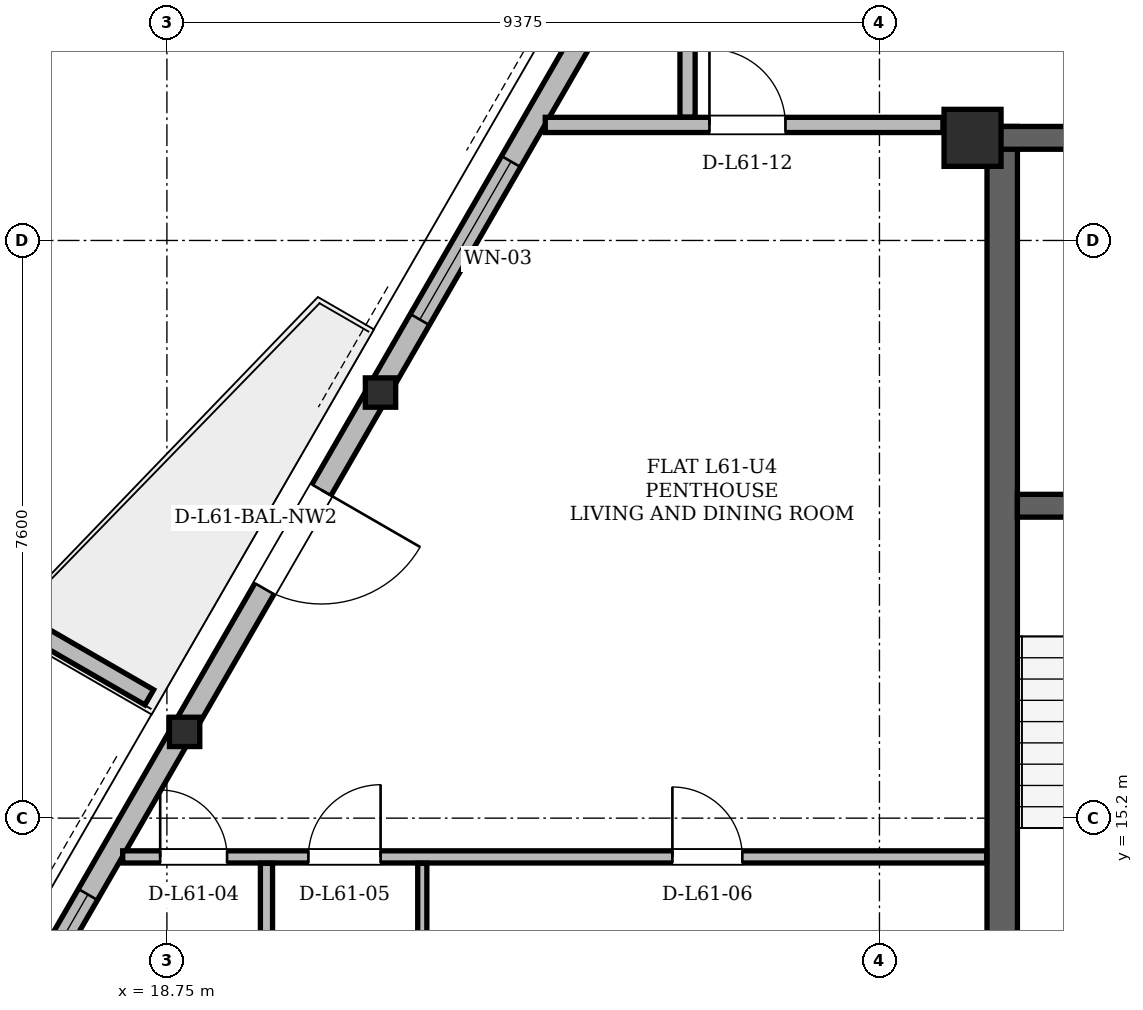
"""IFC4 building model, lengths in metres.
Left out: names, types, materials, properties, quantities, classifications, styles, units other than length and angle.
Written with IfcOpenShell. Run it as: python <this file> out.ifc"""

import sys

from ifc_helpers import new_model, si_unit, direction, frame, frame_2d, origin, origin_2d, place, context, subcontext, project, spatial, polyline, rectangle, hollow_rectangle, i_section, outline, extrude, element, fill, save


model = new_model("IFC4")
c1 = context("Model", 3, precision=1e-05, world=origin(), true_north=direction((0.0, 1.0)))
c2 = subcontext(c1, "Body", "Model", "MODEL_VIEW")
j1 = project(units=[si_unit("LENGTHUNIT", "METRE"), si_unit("PLANEANGLEUNIT", "RADIAN")], contexts=[c1])
p1 = place(None, origin())
s1 = spatial("IfcSite", under=j1, at=p1, CompositionType="ELEMENT")
p2 = place(p1, origin())
s2 = spatial("IfcBuilding", under=s1, at=p2, CompositionType="ELEMENT")
p3 = place(p2, frame((0.0, 0.0, 230.7)))
s3 = spatial("IfcBuildingStorey", under=s2, at=p3, CompositionType="ELEMENT", Elevation=230.7)
p4 = place(p3, frame((29.35, 24.15, 0.0), z_axis=(0.0, 0.0, 1.0), x_axis=(1.0, 0.0, 0.0)))
e1 = element("IfcColumn", 1, at=p4, inside=s3, PredefinedType="COLUMN", context=c2, shape_type="SweptSolid", body=[
    extrude(hollow_rectangle(XDim=0.75, YDim=0.75, WallThickness=0.06, at=origin_2d()), origin(), (0.0, 0.0, 1.0), 3.6),
])
p5 = place(p3, frame((21.535, 20.82, 0.005), z_axis=(0.01407165098, -0.011488449351, 0.999834988471), x_axis=(0.632422318611, 0.774623786701, 0.0)))
e2 = element("IfcColumn", 2, at=p5, inside=s3, PredefinedType="COLUMN", context=c2, shape_type="SweptSolid", body=[
    extrude(i_section(OverallWidth=0.399, OverallDepth=0.386, WebThickness=0.021, FlangeThickness=0.033, at=origin_2d()), origin(), (0.0, 0.0, 1.0), 3.591),
])
p6 = place(p3, frame((18.959, 16.359, 0.005), z_axis=(0.012983894256, -0.013255808272, 0.999827836198), x_axis=(0.714395955768, 0.699741679752, 0.0)))
e3 = element("IfcColumn", 3, at=p6, inside=s3, PredefinedType="COLUMN", context=c2, shape_type="SweptSolid", body=[
    extrude(i_section(OverallWidth=0.399, OverallDepth=0.386, WebThickness=0.021, FlangeThickness=0.033, at=origin_2d()), origin(), (0.0, 0.0, 1.0), 3.592),
])
p7 = place(p3, frame((29.74, 11.0, 0.0), z_axis=(0.0, 0.0, 1.0), x_axis=(0.0, 1.0, 0.0)))
e4 = element("IfcWall", 4, at=p7, inside=s3, PredefinedType="SHEAR", context=c2, shape_type="SweptSolid", body=[
    extrude(rectangle(XDim=13.3, YDim=0.4, at=frame_2d((6.65, 0.0))), origin(), (0.0, 0.0, 1.0), 3.38),
])
p8 = place(p3, frame((29.65, 24.15, 0.0), z_axis=(0.0, 0.0, 1.0), x_axis=(1.0, 0.0, 0.0)))
e5 = element("IfcWall", 5, at=p8, inside=s3, PredefinedType="SHEAR", context=c2, shape_type="SweptSolid", body=[
    extrude(rectangle(XDim=15.7, YDim=0.3, at=frame_2d((7.85, 0.0))), origin(), (0.0, 0.0, 1.0), 3.38),
])
p9 = place(p8, frame((1.7, 0.0, 0.0)))
e6 = element("IfcOpeningElement", 6, at=p9, cuts=e5, PredefinedType="OPENING", context=c2, shape_type="SweptSolid", body=[
    extrude(rectangle(XDim=1.2, YDim=2.2, at=frame_2d((0.6, 1.1))), frame((0.0, 0.15, 0.0), z_axis=(0.0, -1.0, 0.0), x_axis=(1.0, 0.0, 0.0)), (0.0, 0.0, 1.0), 0.3),
])
p10 = place(p8, frame((12.8, 0.0, 0.0)))
e7 = element("IfcOpeningElement", 7, at=p10, cuts=e5, PredefinedType="OPENING", context=c2, shape_type="SweptSolid", body=[
    extrude(rectangle(XDim=1.2, YDim=2.2, at=frame_2d((0.6, 1.1))), frame((0.0, 0.15, 0.0), z_axis=(0.0, -1.0, 0.0), x_axis=(1.0, 0.0, 0.0)), (0.0, 0.0, 1.0), 0.3),
])
p11 = place(p8, frame((6.55, 0.0, 0.0)))
e8 = element("IfcOpeningElement", 8, at=p11, cuts=e5, PredefinedType="OPENING", context=c2, shape_type="SweptSolid", body=[
    extrude(rectangle(XDim=0.9, YDim=2.05, at=frame_2d((0.45, 1.025))), frame((0.0, 0.15, 0.0), z_axis=(0.0, -1.0, 0.0), x_axis=(1.0, 0.0, 0.0)), (0.0, 0.0, 1.0), 0.3),
])
p12 = place(p8, frame((8.45, 0.0, 0.0)))
e9 = element("IfcOpeningElement", 9, at=p12, cuts=e5, PredefinedType="OPENING", context=c2, shape_type="SweptSolid", body=[
    extrude(rectangle(XDim=0.9, YDim=2.05, at=frame_2d((0.45, 1.025))), frame((0.0, 0.15, 0.0), z_axis=(0.0, -1.0, 0.0), x_axis=(1.0, 0.0, 0.0)), (0.0, 0.0, 1.0), 0.3),
])
p13 = place(p3, frame((29.94, 19.31, 0.0), z_axis=(0.0, 0.0, 1.0), x_axis=(1.0, 0.0, 0.0)))
e10 = element("IfcWall", 10, at=p13, inside=s3, PredefinedType="SHEAR", context=c2, shape_type="SweptSolid", body=[
    extrude(rectangle(XDim=4.01, YDim=0.3, at=frame_2d((2.005, 0.0))), origin(), (0.0, 0.0, 1.0), 3.38),
])
p14 = place(p13, frame((1.01, 0.0, 0.0)))
e11 = element("IfcOpeningElement", 11, at=p14, cuts=e10, PredefinedType="OPENING", context=c2, shape_type="SweptSolid", body=[
    extrude(rectangle(XDim=1.4, YDim=2.2, at=frame_2d((0.7, 1.1))), frame((0.0, 0.15, 0.0), z_axis=(0.0, -1.0, 0.0), x_axis=(1.0, 0.0, 0.0)), (0.0, 0.0, 1.0), 0.3),
])
p15 = place(p3, frame((34.414, 43.126, 0.0), z_axis=(0.0, 0.0, 1.0), x_axis=(-0.50000331183, -0.86602349169, 0.0)))
e12 = element("IfcWall", 12, at=p15, inside=s3, PredefinedType="SOLIDWALL", context=c2, shape_type="SweptSolid", body=[
    extrude(rectangle(XDim=36.795, YDim=0.29, at=frame_2d((18.397, 0.0))), origin(), (0.0, 0.0, 1.0), 2.677),
])
p16 = place(p15, frame((3.529, 0.0, 0.0)))
e13 = element("IfcOpeningElement", 13, at=p16, cuts=e12, PredefinedType="OPENING", context=c2, shape_type="SweptSolid", body=[
    extrude(rectangle(XDim=1.3, YDim=2.2, at=frame_2d((0.65, 1.1))), frame((0.0, 0.145, 0.0), z_axis=(0.0, -1.0, 0.0), x_axis=(1.0, 0.0, 0.0)), (0.0, 0.0, 1.0), 0.29),
])
p17 = place(p15, frame((27.261, 0.0, 0.0)))
e14 = element("IfcOpeningElement", 14, at=p17, cuts=e12, PredefinedType="OPENING", context=c2, shape_type="SweptSolid", body=[
    extrude(rectangle(XDim=1.5, YDim=2.2, at=frame_2d((0.75, 1.1))), frame((0.0, 0.145, 0.0), z_axis=(0.0, -1.0, 0.0), x_axis=(1.0, 0.0, 0.0)), (0.0, 0.0, 1.0), 0.29),
])
p18 = place(p15, frame((22.271, 0.0, 0.85)))
e15 = element("IfcOpeningElement", 15, at=p18, cuts=e12, PredefinedType="OPENING", context=c2, shape_type="SweptSolid", body=[
    extrude(rectangle(XDim=2.4, YDim=1.717, at=frame_2d((1.2, 0.858))), frame((0.0, 0.145, 0.0), z_axis=(0.0, -1.0, 0.0), x_axis=(1.0, 0.0, 0.0)), (0.0, 0.0, 1.0), 0.29),
])
p19 = place(p15, frame((33.406, 0.0, 0.85)))
e16 = element("IfcOpeningElement", 16, at=p19, cuts=e12, PredefinedType="OPENING", context=c2, shape_type="SweptSolid", body=[
    extrude(rectangle(XDim=2.2, YDim=1.717, at=frame_2d((1.1, 0.858))), frame((0.0, 0.145, 0.0), z_axis=(0.0, -1.0, 0.0), x_axis=(1.0, 0.0, 0.0)), (0.0, 0.0, 1.0), 0.29),
])
p20 = place(p15, frame((11.662, 0.0, 0.85)))
e17 = element("IfcOpeningElement", 17, at=p20, cuts=e12, PredefinedType="OPENING", context=c2, shape_type="SweptSolid", body=[
    extrude(rectangle(XDim=1.2, YDim=1.48, at=frame_2d((0.6, 0.74))), frame((0.0, 0.145, 0.0), z_axis=(0.0, -1.0, 0.0), x_axis=(1.0, 0.0, 0.0)), (0.0, 0.0, 1.0), 0.29),
])
p21 = place(p15, frame((16.295, 0.0, 0.85)))
e18 = element("IfcOpeningElement", 18, at=p21, cuts=e12, PredefinedType="OPENING", context=c2, shape_type="SweptSolid", body=[
    extrude(rectangle(XDim=1.8, YDim=1.717, at=frame_2d((0.9, 0.858))), frame((0.0, 0.145, 0.0), z_axis=(0.0, -1.0, 0.0), x_axis=(1.0, 0.0, 0.0)), (0.0, 0.0, 1.0), 0.29),
])
p22 = place(p3, frame((18.518, 16.79, 0.0), z_axis=(0.0, 0.0, 1.0), x_axis=(-0.866012356593, 0.500022597718, 0.0)))
e19 = element("IfcWall", 19, at=p22, inside=s3, PredefinedType="PARAPET", context=c2, shape_type="SweptSolid", body=[
    extrude(outline(polyline([(0.0, 0.0), (2.042, 0.0), (2.042, 1.1), (0.0, 1.32), (0.0, 0.0)])), frame((0.0, 0.115, 0.0), z_axis=(0.0, -1.0, 0.0), x_axis=(1.0, 0.0, 0.0)), (0.0, 0.0, 1.0), 0.23),
])
p23 = place(p3, frame((18.168, 14.69, 0.0), z_axis=(0.0, 0.0, 1.0), x_axis=(1.0, 0.0, 0.0)))
e20 = element("IfcWall", 20, at=p23, inside=s3, PredefinedType="PARTITIONING", context=c2, shape_type="SweptSolid", body=[
    extrude(rectangle(XDim=11.368, YDim=0.16, at=frame_2d((5.684, 0.0))), origin(), (0.0, 0.0, 1.0), 2.52),
])
p24 = place(p23, frame((0.493, 0.0, 0.0)))
e21 = element("IfcOpeningElement", 21, at=p24, cuts=e20, PredefinedType="OPENING", context=c2, shape_type="SweptSolid", body=[
    extrude(rectangle(XDim=0.88, YDim=2.08, at=frame_2d((0.44, 1.04))), frame((0.0, 0.08, 0.0), z_axis=(0.0, -1.0, 0.0), x_axis=(1.0, 0.0, 0.0)), (0.0, 0.0, 1.0), 0.16),
])
p25 = place(p23, frame((2.443, 0.0, 0.0)))
e22 = element("IfcOpeningElement", 22, at=p25, cuts=e20, PredefinedType="OPENING", context=c2, shape_type="SweptSolid", body=[
    extrude(rectangle(XDim=0.95, YDim=2.1, at=frame_2d((0.475, 1.05))), frame((0.0, 0.08, 0.0), z_axis=(0.0, -1.0, 0.0), x_axis=(1.0, 0.0, 0.0)), (0.0, 0.0, 1.0), 0.16),
])
p26 = place(p23, frame((7.232, 0.0, 0.0)))
e23 = element("IfcOpeningElement", 23, at=p26, cuts=e20, PredefinedType="OPENING", context=c2, shape_type="SweptSolid", body=[
    extrude(rectangle(XDim=0.92, YDim=2.12, at=frame_2d((0.46, 1.06))), frame((0.0, 0.08, 0.0), z_axis=(0.0, -1.0, 0.0), x_axis=(1.0, 0.0, 0.0)), (0.0, 0.0, 1.0), 0.16),
])
p27 = place(p3, frame((23.728, 24.32, 0.0), z_axis=(0.0, 0.0, 1.0), x_axis=(1.0, 0.0, 0.0)))
e24 = element("IfcWall", 24, at=p27, inside=s3, PredefinedType="PARTITIONING", context=c2, shape_type="SweptSolid", body=[
    extrude(rectangle(XDim=5.232, YDim=0.2, at=frame_2d((2.616, 0.0))), origin(), (0.0, 0.0, 1.0), 3.38),
])
p28 = place(p27, frame((2.16, 0.0, 0.0)))
e25 = element("IfcOpeningElement", 25, at=p28, cuts=e24, PredefinedType="OPENING", context=c2, shape_type="SweptSolid", body=[
    extrude(rectangle(XDim=1.0, YDim=2.18, at=frame_2d((0.5, 1.09))), frame((0.0, 0.1, 0.0), z_axis=(0.0, -1.0, 0.0), x_axis=(1.0, 0.0, 0.0)), (0.0, 0.0, 1.0), 0.2),
])
p29 = place(p3, frame((20.06, 11.054, 0.0), z_axis=(0.0, 0.0, 1.0), x_axis=(0.0, 1.0, 0.0)))
e26 = element("IfcWall", 26, at=p29, inside=s3, PredefinedType="PARTITIONING", context=c2, shape_type="SweptSolid", body=[
    extrude(rectangle(XDim=3.552, YDim=0.16, at=frame_2d((1.776, 0.0))), origin(), (0.0, 0.0, 1.0), 2.913),
])
p30 = place(p3, frame((22.11, 11.054, 0.0), z_axis=(0.0, 0.0, 1.0), x_axis=(0.0, 1.0, 0.0)))
e27 = element("IfcWall", 27, at=p30, inside=s3, PredefinedType="PARTITIONING", context=c2, shape_type="SweptSolid", body=[
    extrude(rectangle(XDim=3.552, YDim=0.12, at=frame_2d((1.776, 0.0))), origin(), (0.0, 0.0, 1.0), 3.38),
])
p31 = place(p3, frame((25.6, 24.424, 0.0), z_axis=(0.0, 0.0, 1.0), x_axis=(0.0, 1.0, 0.0)))
e28 = element("IfcWall", 28, at=p31, inside=s3, PredefinedType="PARTITIONING", context=c2, shape_type="SweptSolid", body=[
    extrude(rectangle(XDim=1.442, YDim=0.2, at=frame_2d((0.721, 0.0))), origin(), (0.0, 0.0, 1.0), 3.38),
])
p32 = place(p17, origin())
e29 = element("IfcDoor", 29, at=p32, inside=s3, OperationType="SINGLE_SWING_LEFT", PredefinedType="DOOR", context=c2, shape_type="SweptSolid", body=[
    extrude(rectangle(XDim=1.5, YDim=2.2, at=frame_2d((0.75, 1.1))), frame((0.0, 0.025, 0.0), z_axis=(0.0, -1.0, 0.0), x_axis=(1.0, 0.0, 0.0)), (0.0, 0.0, 1.0), 0.05),
])
fill(e14, e29)
p33 = place(p18, origin())
e30 = element("IfcWindow", 30, at=p33, inside=s3, PartitioningType="SINGLE_PANEL", PredefinedType="WINDOW", context=c2, shape_type="SweptSolid", body=[
    extrude(rectangle(XDim=2.4, YDim=1.717, at=frame_2d((1.2, 0.858))), frame((0.0, 0.03, 0.0), z_axis=(0.0, -1.0, 0.0), x_axis=(1.0, 0.0, 0.0)), (0.0, 0.0, 1.0), 0.06),
])
fill(e15, e30)
p34 = place(p19, origin())
e31 = element("IfcWindow", 31, at=p34, inside=s3, PartitioningType="SINGLE_PANEL", PredefinedType="WINDOW", context=c2, shape_type="SweptSolid", body=[
    extrude(rectangle(XDim=2.2, YDim=1.717, at=frame_2d((1.1, 0.858))), frame((0.0, 0.03, 0.0), z_axis=(0.0, -1.0, 0.0), x_axis=(1.0, 0.0, 0.0)), (0.0, 0.0, 1.0), 0.06),
])
fill(e16, e31)
p35 = place(p24, origin())
e32 = element("IfcDoor", 32, at=p35, inside=s3, OperationType="SINGLE_SWING_LEFT", PredefinedType="DOOR", context=c2, shape_type="SweptSolid", body=[
    extrude(rectangle(XDim=0.88, YDim=2.08, at=frame_2d((0.44, 1.04))), frame((0.0, 0.025, 0.0), z_axis=(0.0, -1.0, 0.0), x_axis=(1.0, 0.0, 0.0)), (0.0, 0.0, 1.0), 0.05),
])
fill(e21, e32)
p36 = place(p25, origin())
e33 = element("IfcDoor", 33, at=p36, inside=s3, OperationType="SINGLE_SWING_RIGHT", PredefinedType="DOOR", context=c2, shape_type="SweptSolid", body=[
    extrude(rectangle(XDim=0.95, YDim=2.1, at=frame_2d((0.475, 1.05))), frame((0.0, 0.025, 0.0), z_axis=(0.0, -1.0, 0.0), x_axis=(1.0, 0.0, 0.0)), (0.0, 0.0, 1.0), 0.05),
])
fill(e22, e33)
p37 = place(p26, origin())
e34 = element("IfcDoor", 34, at=p37, inside=s3, OperationType="SINGLE_SWING_LEFT", PredefinedType="DOOR", context=c2, shape_type="SweptSolid", body=[
    extrude(rectangle(XDim=0.92, YDim=2.12, at=frame_2d((0.46, 1.06))), frame((0.0, 0.025, 0.0), z_axis=(0.0, -1.0, 0.0), x_axis=(1.0, 0.0, 0.0)), (0.0, 0.0, 1.0), 0.05),
])
fill(e23, e34)
p38 = place(p28, origin())
e35 = element("IfcDoor", 35, at=p38, inside=s3, OperationType="SINGLE_SWING_LEFT", PredefinedType="DOOR", context=c2, shape_type="SweptSolid", body=[
    extrude(rectangle(XDim=1.0, YDim=2.18, at=frame_2d((0.5, 1.09))), frame((0.0, 0.025, 0.0), z_axis=(0.0, -1.0, 0.0), x_axis=(1.0, 0.0, 0.0)), (0.0, 0.0, 1.0), 0.05),
])
fill(e25, e35)
save(model, sys.argv[1])
